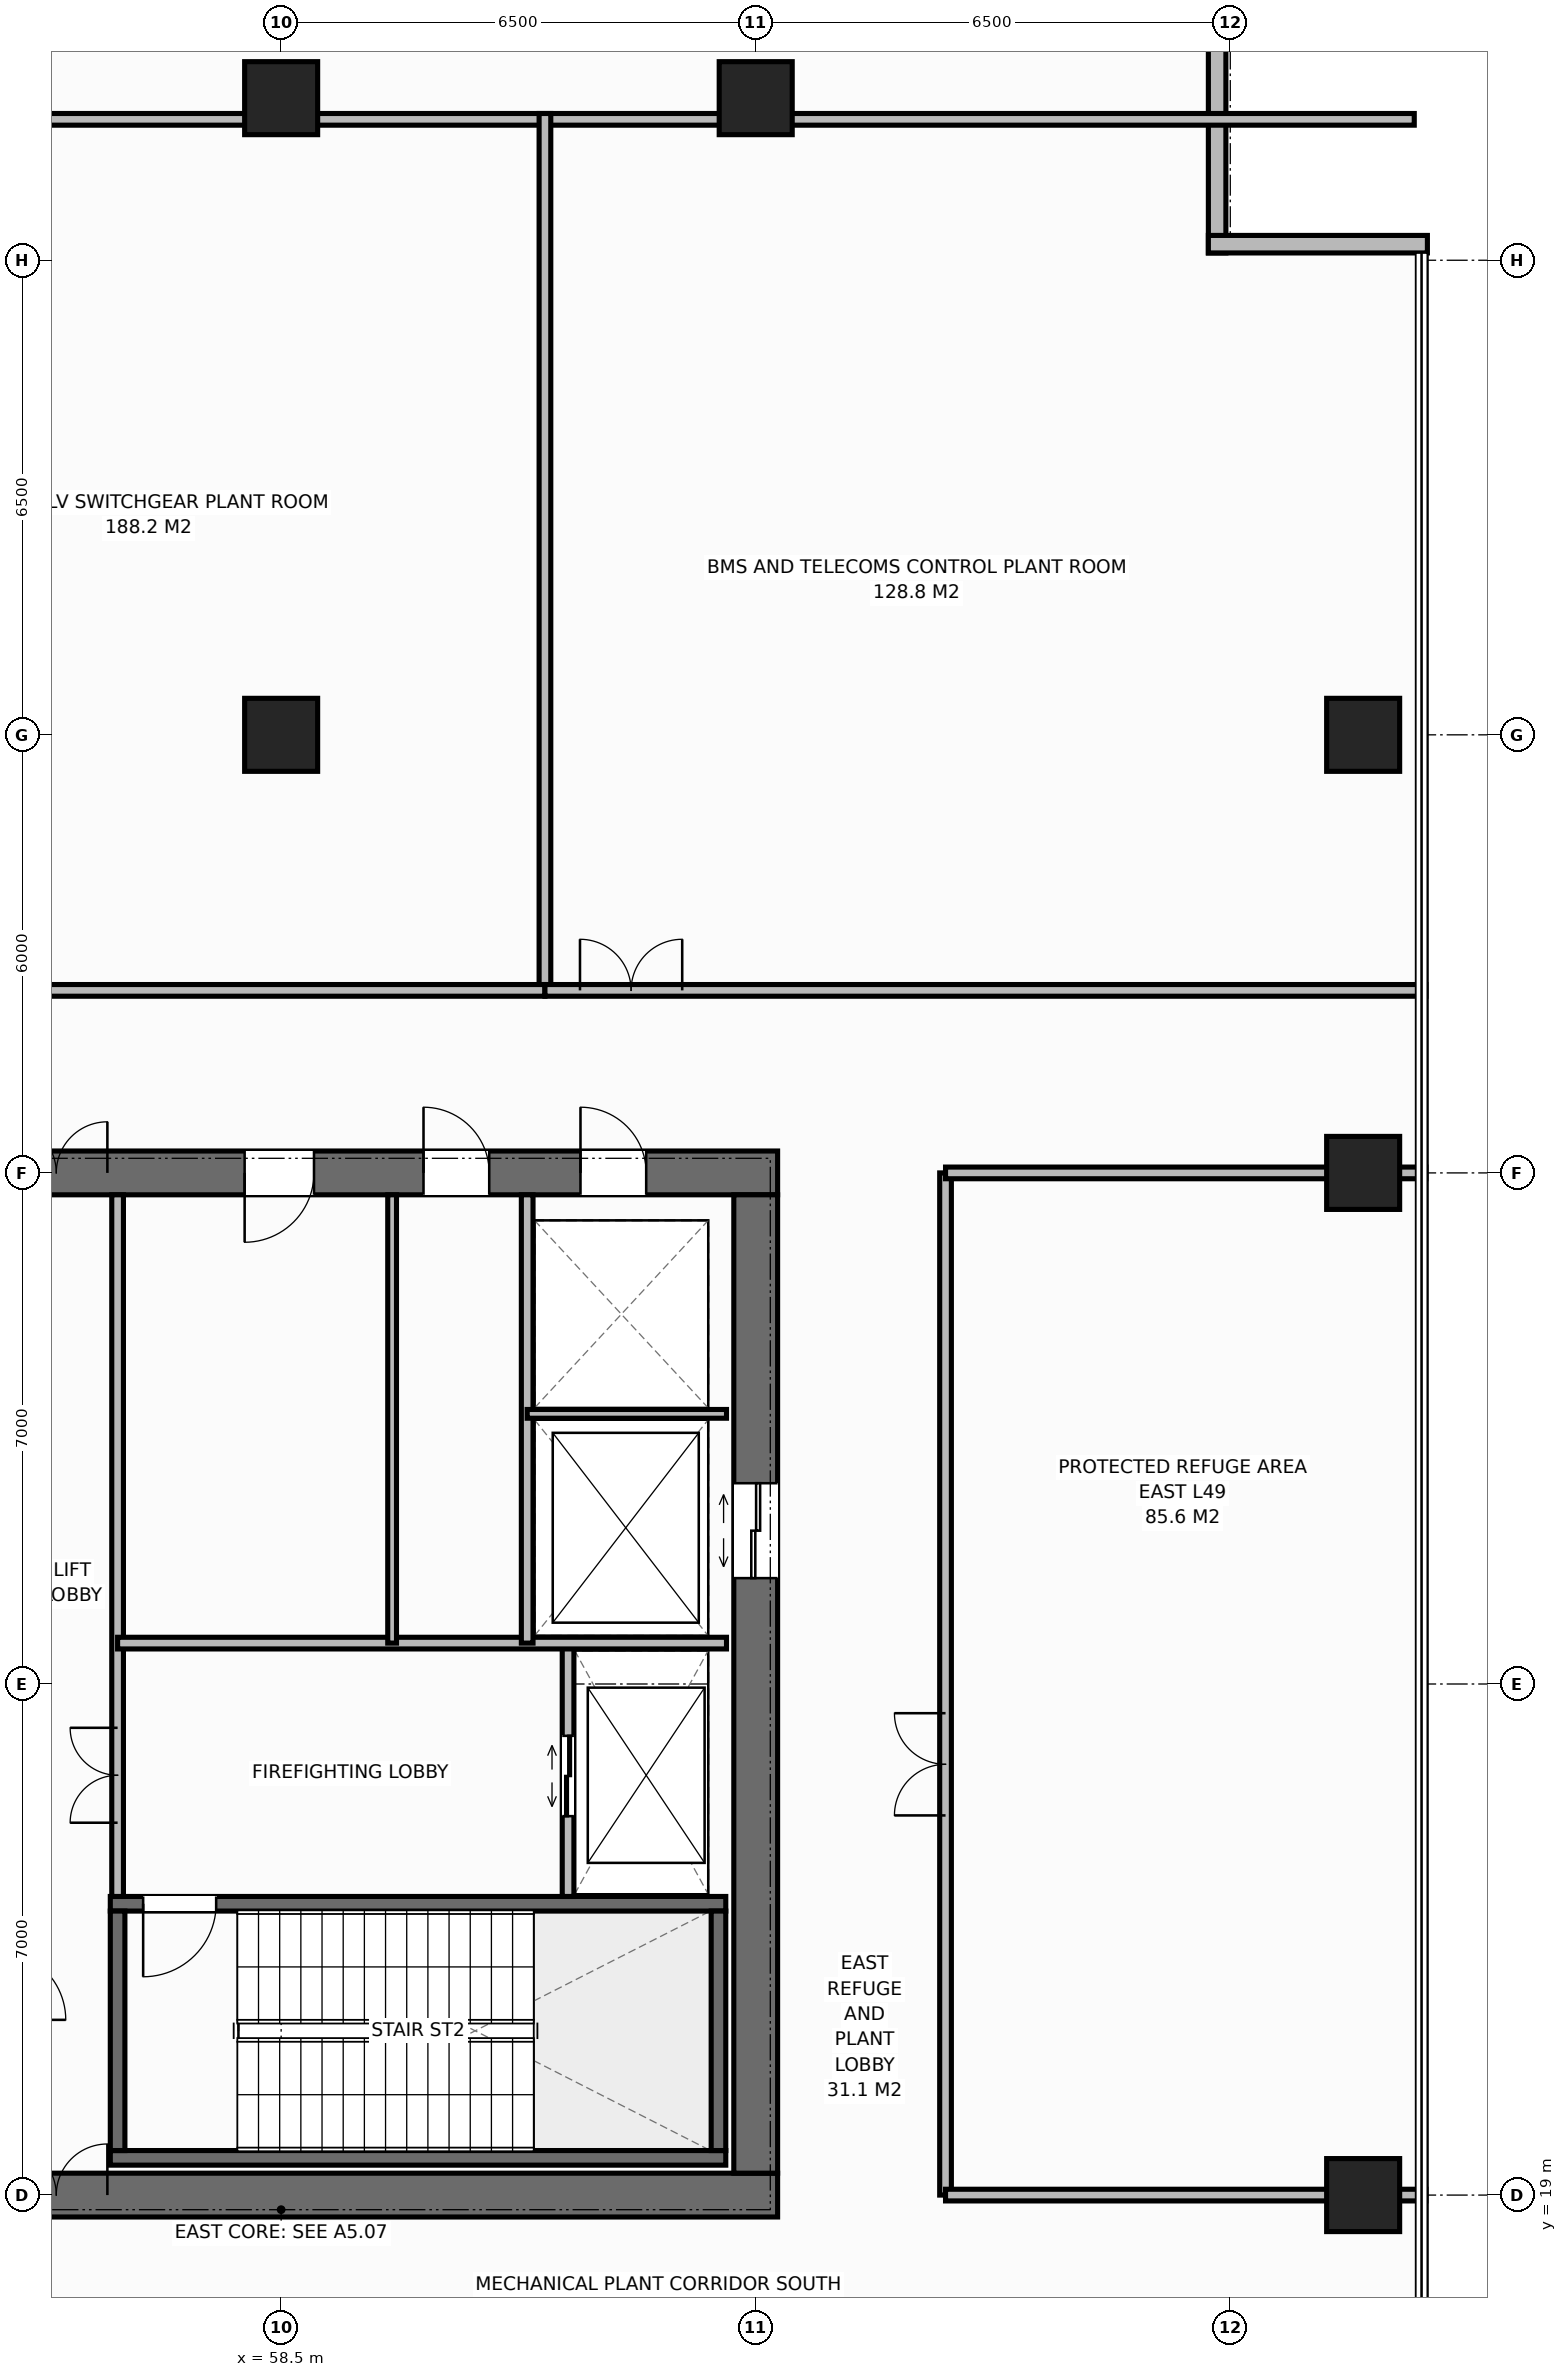
"""IFC4 building model, lengths in metres.
Left out: names, types, materials, properties, quantities, classifications, styles, units other than length and angle.
Written with IfcOpenShell. Run it as: python <this file> out.ifc"""

import sys

from ifc_helpers import new_model, si_unit, direction, frame, frame_2d, origin, origin_2d, place, context, subcontext, project, spatial, rectangle, extrude, element, fill, save


model = new_model("IFC4")
c1 = context("Model", 3, precision=1e-05, world=origin(), true_north=direction((0.0, 1.0)))
c2 = subcontext(c1, "Body", "Model", "MODEL_VIEW")
j1 = project(units=[si_unit("LENGTHUNIT", "METRE"), si_unit("PLANEANGLEUNIT", "RADIAN")], contexts=[c1])
p1 = place(None, origin())
s1 = spatial("IfcSite", under=j1, at=p1, CompositionType="ELEMENT")
p2 = place(p1, origin())
s2 = spatial("IfcBuilding", under=s1, at=p2, CompositionType="ELEMENT")
p3 = place(p2, frame((0.0, 0.0, 197.4)))
s3 = spatial("IfcBuildingStorey", under=s2, at=p3, CompositionType="ELEMENT", Elevation=197.4)
p4 = place(p3, frame((51.7, 19.0, 0.0), z_axis=(0.0, 0.0, 1.0), x_axis=(1.0, 0.0, 0.0)))
e1 = element("IfcWall", 1, at=p4, inside=s3, PredefinedType="SHEAR", context=c2, shape_type="SweptSolid", body=[
    extrude(rectangle(XDim=13.6, YDim=0.6, at=frame_2d((6.8, 0.0))), origin(), (0.0, 0.0, 1.0), 5.0),
])
p5 = place(p4, frame((3.02, 0.0, 0.0)))
e2 = element("IfcOpeningElement", 2, at=p5, cuts=e1, PredefinedType="OPENING", context=c2, shape_type="SweptSolid", body=[
    extrude(rectangle(XDim=1.4, YDim=2.2, at=frame_2d((0.7, 1.1))), frame((0.0, 0.31, 0.0), z_axis=(0.0, -1.0, 0.0), x_axis=(1.0, 0.0, 0.0)), (0.0, 0.0, 1.0), 0.62),
])
p6 = place(p3, frame((51.7, 33.0, 0.0), z_axis=(0.0, 0.0, 1.0), x_axis=(1.0, 0.0, 0.0)))
e3 = element("IfcWall", 3, at=p6, inside=s3, PredefinedType="SHEAR", context=c2, shape_type="SweptSolid", body=[
    extrude(rectangle(XDim=13.6, YDim=0.6, at=frame_2d((6.8, 0.0))), origin(), (0.0, 0.0, 1.0), 5.0),
])
p7 = place(p6, frame((3.02, 0.0, 0.0)))
e4 = element("IfcOpeningElement", 4, at=p7, cuts=e3, PredefinedType="OPENING", context=c2, shape_type="SweptSolid", body=[
    extrude(rectangle(XDim=1.4, YDim=2.2, at=frame_2d((0.7, 1.1))), frame((0.0, 0.31, 0.0), z_axis=(0.0, -1.0, 0.0), x_axis=(1.0, 0.0, 0.0)), (0.0, 0.0, 1.0), 0.62),
])
p8 = place(p6, frame((10.9, 0.0, 0.0)))
e5 = element("IfcOpeningElement", 5, at=p8, cuts=e3, PredefinedType="OPENING", context=c2, shape_type="SweptSolid", body=[
    extrude(rectangle(XDim=0.9, YDim=2.15, at=frame_2d((0.45, 1.075))), frame((0.0, 0.31, 0.0), z_axis=(0.0, -1.0, 0.0), x_axis=(1.0, 0.0, 0.0)), (0.0, 0.0, 1.0), 0.62),
])
p9 = place(p6, frame((6.3, 0.0, 0.0)))
e6 = element("IfcOpeningElement", 6, at=p9, cuts=e3, PredefinedType="OPENING", context=c2, shape_type="SweptSolid", body=[
    extrude(rectangle(XDim=0.95, YDim=2.15, at=frame_2d((0.475, 1.075))), frame((0.0, 0.31, 0.0), z_axis=(0.0, -1.0, 0.0), x_axis=(1.0, 0.0, 0.0)), (0.0, 0.0, 1.0), 0.62),
])
p10 = place(p6, frame((8.75, 0.0, 0.0)))
e7 = element("IfcOpeningElement", 7, at=p10, cuts=e3, PredefinedType="OPENING", context=c2, shape_type="SweptSolid", body=[
    extrude(rectangle(XDim=0.9, YDim=2.15, at=frame_2d((0.45, 1.075))), frame((0.0, 0.31, 0.0), z_axis=(0.0, -1.0, 0.0), x_axis=(1.0, 0.0, 0.0)), (0.0, 0.0, 1.0), 0.62),
])
p11 = place(p3, frame((65.0, 19.3, 0.0), z_axis=(0.0, 0.0, 1.0), x_axis=(0.0, 1.0, 0.0)))
e8 = element("IfcWall", 8, at=p11, inside=s3, PredefinedType="SHEAR", context=c2, shape_type="SweptSolid", body=[
    extrude(rectangle(XDim=13.4, YDim=0.6, at=frame_2d((6.7, 0.0))), origin(), (0.0, 0.0, 1.0), 5.0),
])
p12 = place(p11, frame((8.15, 0.0, 0.0)))
e9 = element("IfcOpeningElement", 9, at=p12, cuts=e8, PredefinedType="OPENING", context=c2, shape_type="SweptSolid", body=[
    extrude(rectangle(XDim=1.3, YDim=2.2, at=frame_2d((0.65, 1.1))), frame((0.0, 0.31, 0.0), z_axis=(0.0, -1.0, 0.0), x_axis=(1.0, 0.0, 0.0)), (0.0, 0.0, 1.0), 0.62),
])
p13 = place(p3, frame((56.16, 19.51, 0.0), z_axis=(0.0, 0.0, 1.0), x_axis=(1.0, 0.0, 0.0)))
e10 = element("IfcWall", 10, at=p13, inside=s3, PredefinedType="SHEAR", context=c2, shape_type="SweptSolid", body=[
    extrude(rectangle(XDim=8.43, YDim=0.2, at=frame_2d((4.215, 0.0))), origin(), (0.0, 0.0, 1.0), 5.0),
])
p14 = place(p3, frame((56.16, 22.99, 0.0), z_axis=(0.0, 0.0, 1.0), x_axis=(1.0, 0.0, 0.0)))
e11 = element("IfcWall", 11, at=p14, inside=s3, PredefinedType="SHEAR", context=c2, shape_type="SweptSolid", body=[
    extrude(rectangle(XDim=8.43, YDim=0.2, at=frame_2d((4.215, 0.0))), origin(), (0.0, 0.0, 1.0), 5.0),
])
p15 = place(p14, frame((0.45, 0.0, 0.0)))
e12 = element("IfcOpeningElement", 12, at=p15, cuts=e11, PredefinedType="OPENING", context=c2, shape_type="SweptSolid", body=[
    extrude(rectangle(XDim=1.0, YDim=2.15, at=frame_2d((0.5, 1.075))), frame((0.0, 0.11, 0.0), z_axis=(0.0, -1.0, 0.0), x_axis=(1.0, 0.0, 0.0)), (0.0, 0.0, 1.0), 0.22),
])
for number, where, z_axis, x_axis in (
    (13, (56.26, 19.61, 0.0), (0.0, 0.0, 1.0), (0.0, 1.0, 0.0)),
    (14, (64.49, 19.61, 0.0), (0.0, 0.0, 1.0), (0.0, 1.0, 0.0)),
):
    element("IfcWall", number, at=place(p3, frame(where, z_axis=z_axis, x_axis=x_axis)), inside=s3, PredefinedType="SHEAR", context=c2, shape_type="SweptSolid", body=[
        extrude(rectangle(XDim=3.28, YDim=0.2, at=frame_2d((1.64, 0.0))), origin(), (0.0, 0.0, 1.0), 5.0),
    ])
for number, where, z_axis, x_axis in (
    (15, (58.5, 39.0, 0.0), (0.0, 0.0, 1.0), (1.0, 0.0, 0.0)),
    (16, (58.5, 47.72, 0.0), (0.0, 0.0, 1.0), (1.0, 0.0, 0.0)),
    (17, (65.0, 47.72, 0.0), (0.0, 0.0, 1.0), (1.0, 0.0, 0.0)),
    (18, (73.32, 19.0, 0.0), (0.0, 0.0, 1.0), (1.0, 0.0, 0.0)),
    (19, (73.32, 33.0, 0.0), (0.0, 0.0, 1.0), (1.0, 0.0, 0.0)),
    (20, (73.32, 39.0, 0.0), (0.0, 0.0, 1.0), (1.0, 0.0, 0.0)),
):
    element("IfcColumn", number, at=place(p3, frame(where, z_axis=z_axis, x_axis=x_axis)), inside=s3, PredefinedType="COLUMN", context=c2, shape_type="SweptSolid", body=[
        extrude(rectangle(XDim=1.0, YDim=1.0, at=origin_2d()), origin(), (0.0, 0.0, 1.0), 5.0),
    ])
for number, where, z_axis, x_axis in (
    (21, (71.32, 48.6, 0.0), (0.0, 0.0, 1.0), (0.0, -1.0, 0.0)),
    (22, (71.2, 45.72, 0.0), (0.0, 0.0, 1.0), (1.0, 0.0, 0.0)),
):
    element("IfcWall", number, at=place(p3, frame(where, z_axis=z_axis, x_axis=x_axis)), inside=s3, PredefinedType="STANDARD", context=c2, shape_type="SweptSolid", body=[
        extrude(rectangle(XDim=3.0, YDim=0.24, at=frame_2d((1.5, 0.0))), origin(), (0.0, 0.0, 1.0), 4.78),
    ])
p16 = place(p3, frame((56.26, 23.09, 0.0), z_axis=(0.0, 0.0, 1.0), x_axis=(0.0, 1.0, 0.0)))
e23 = element("IfcWall", 23, at=p16, inside=s3, PredefinedType="STANDARD", context=c2, shape_type="SweptSolid", body=[
    extrude(rectangle(XDim=9.61, YDim=0.16, at=frame_2d((4.805, 0.0))), origin(), (0.0, 0.0, 1.0), 4.78),
])
p17 = place(p16, frame((1.01, 0.0, 0.0)))
e24 = element("IfcOpeningElement", 24, at=p17, cuts=e23, PredefinedType="OPENING", context=c2, shape_type="SweptSolid", body=[
    extrude(rectangle(XDim=1.3, YDim=2.2, at=frame_2d((0.65, 1.1))), frame((0.0, 0.09, 0.0), z_axis=(0.0, -1.0, 0.0), x_axis=(1.0, 0.0, 0.0)), (0.0, 0.0, 1.0), 0.18),
])
p18 = place(p3, frame((62.43, 23.09, 0.0), z_axis=(0.0, 0.0, 1.0), x_axis=(0.0, 1.0, 0.0)))
e25 = element("IfcWall", 25, at=p18, inside=s3, PredefinedType="STANDARD", context=c2, shape_type="SweptSolid", body=[
    extrude(rectangle(XDim=3.47, YDim=0.16, at=frame_2d((1.735, 0.0))), origin(), (0.0, 0.0, 1.0), 4.78),
])
p19 = place(p18, frame((1.1, 0.0, 0.0)))
e26 = element("IfcOpeningElement", 26, at=p19, cuts=e25, PredefinedType="OPENING", context=c2, shape_type="SweptSolid", body=[
    extrude(rectangle(XDim=1.1, YDim=2.2, at=frame_2d((0.55, 1.1))), frame((0.0, 0.09, 0.0), z_axis=(0.0, -1.0, 0.0), x_axis=(1.0, 0.0, 0.0)), (0.0, 0.0, 1.0), 0.18),
])
p20 = place(p3, frame((56.26, 26.56, 0.0), z_axis=(0.0, 0.0, 1.0), x_axis=(1.0, 0.0, 0.0)))
e27 = element("IfcWall", 27, at=p20, inside=s3, PredefinedType="STANDARD", context=c2, shape_type="SweptSolid", body=[
    extrude(rectangle(XDim=8.34, YDim=0.16, at=frame_2d((4.17, 0.0))), origin(), (0.0, 0.0, 1.0), 4.78),
])
p21 = place(p3, frame((61.87, 26.56, 0.0), z_axis=(0.0, 0.0, 1.0), x_axis=(0.0, 1.0, 0.0)))
e28 = element("IfcWall", 28, at=p21, inside=s3, PredefinedType="STANDARD", context=c2, shape_type="SweptSolid", body=[
    extrude(rectangle(XDim=6.14, YDim=0.16, at=frame_2d((3.07, 0.0))), origin(), (0.0, 0.0, 1.0), 4.78),
])
p22 = place(p3, frame((61.87, 29.7, 0.0), z_axis=(0.0, 0.0, 1.0), x_axis=(1.0, 0.0, 0.0)))
e29 = element("IfcWall", 29, at=p22, inside=s3, PredefinedType="PARTITIONING", context=c2, shape_type="SweptSolid", body=[
    extrude(rectangle(XDim=2.73, YDim=0.12, at=frame_2d((1.365, 0.0))), origin(), (0.0, 0.0, 1.0), 4.78),
])
p23 = place(p3, frame((60.02, 26.56, 0.0), z_axis=(0.0, 0.0, 1.0), x_axis=(0.0, 1.0, 0.0)))
e30 = element("IfcWall", 30, at=p23, inside=s3, PredefinedType="PARTITIONING", context=c2, shape_type="SweptSolid", body=[
    extrude(rectangle(XDim=6.14, YDim=0.12, at=frame_2d((3.07, 0.0))), origin(), (0.0, 0.0, 1.0), 4.78),
])
p24 = place(p3, frame((3.98, 47.43, 0.0), z_axis=(0.0, 0.0, 1.0), x_axis=(1.0, 0.0, 0.0)))
e31 = element("IfcWall", 31, at=p24, inside=s3, PredefinedType="STANDARD", context=c2, shape_type="SweptSolid", body=[
    extrude(rectangle(XDim=70.04, YDim=0.16, at=frame_2d((35.02, 0.0))), origin(), (0.0, 0.0, 1.0), 4.78),
])
p25 = place(p3, frame((67.6, 19.0, 0.0), z_axis=(0.0, 0.0, 1.0), x_axis=(0.0, 1.0, 0.0)))
e32 = element("IfcWall", 32, at=p25, inside=s3, PredefinedType="STANDARD", context=c2, shape_type="SweptSolid", body=[
    extrude(rectangle(XDim=14.0, YDim=0.16, at=frame_2d((7.0, 0.0))), origin(), (0.0, 0.0, 1.0), 4.78),
])
p26 = place(p25, frame((5.2, 0.0, 0.0)))
e33 = element("IfcOpeningElement", 33, at=p26, cuts=e32, PredefinedType="OPENING", context=c2, shape_type="SweptSolid", body=[
    extrude(rectangle(XDim=1.4, YDim=2.2, at=frame_2d((0.7, 1.1))), frame((0.0, 0.09, 0.0), z_axis=(0.0, -1.0, 0.0), x_axis=(1.0, 0.0, 0.0)), (0.0, 0.0, 1.0), 0.18),
])
for number, where, z_axis, x_axis in (
    (34, (67.6, 19.0, 0.0), (0.0, 0.0, 1.0), (1.0, 0.0, 0.0)),
    (35, (67.6, 33.0, 0.0), (0.0, 0.0, 1.0), (1.0, 0.0, 0.0)),
):
    element("IfcWall", number, at=place(p3, frame(where, z_axis=z_axis, x_axis=x_axis)), inside=s3, PredefinedType="STANDARD", context=c2, shape_type="SweptSolid", body=[
        extrude(rectangle(XDim=6.58, YDim=0.16, at=frame_2d((3.29, 0.0))), origin(), (0.0, 0.0, 1.0), 3.26),
    ])
p27 = place(p3, frame((62.113, 35.5, 0.0), z_axis=(0.0, 0.0, 1.0), x_axis=(0.0, 1.0, 0.0)))
e36 = element("IfcWall", 36, at=p27, inside=s3, PredefinedType="STANDARD", context=c2, shape_type="SweptSolid", body=[
    extrude(rectangle(XDim=12.01, YDim=0.16, at=frame_2d((6.005, 0.0))), origin(), (0.0, 0.0, 1.0), 4.78),
])
p28 = place(p3, frame((46.004, 35.5, 0.0), z_axis=(0.0, 0.0, 1.0), x_axis=(1.0, 0.0, 0.0)))
e37 = element("IfcWall", 37, at=p28, inside=s3, PredefinedType="STANDARD", context=c2, shape_type="SweptSolid", body=[
    extrude(rectangle(XDim=16.109, YDim=0.16, at=frame_2d((8.055, 0.0))), origin(), (0.0, 0.0, 1.0), 4.78),
])
p29 = place(p28, frame((7.354, 0.0, 0.0)))
e38 = element("IfcOpeningElement", 38, at=p29, cuts=e37, PredefinedType="OPENING", context=c2, shape_type="SweptSolid", body=[
    extrude(rectangle(XDim=1.4, YDim=2.2, at=frame_2d((0.7, 1.1))), frame((0.0, 0.09, 0.0), z_axis=(0.0, -1.0, 0.0), x_axis=(1.0, 0.0, 0.0)), (0.0, 0.0, 1.0), 0.18),
])
p30 = place(p3, frame((62.113, 35.5, 0.0), z_axis=(0.0, 0.0, 1.0), x_axis=(1.0, 0.0, 0.0)))
e39 = element("IfcWall", 39, at=p30, inside=s3, PredefinedType="STANDARD", context=c2, shape_type="SweptSolid", body=[
    extrude(rectangle(XDim=12.067, YDim=0.16, at=frame_2d((6.033, 0.0))), origin(), (0.0, 0.0, 1.0), 4.78),
])
p31 = place(p30, frame((0.48, 0.0, 0.0)))
e40 = element("IfcOpeningElement", 40, at=p31, cuts=e39, PredefinedType="OPENING", context=c2, shape_type="SweptSolid", body=[
    extrude(rectangle(XDim=1.4, YDim=2.2, at=frame_2d((0.7, 1.1))), frame((0.0, 0.09, 0.0), z_axis=(0.0, -1.0, 0.0), x_axis=(1.0, 0.0, 0.0)), (0.0, 0.0, 1.0), 0.18),
])
p32 = place(p5, origin())
e41 = element("IfcDoor", 41, at=p32, inside=s3, OperationType="DOUBLE_DOOR_SINGLE_SWING", PredefinedType="DOOR", context=c2, shape_type="SweptSolid", body=[
    extrude(rectangle(XDim=1.4, YDim=2.2, at=frame_2d((0.7, 1.1))), frame((0.0, 0.075, 0.0), z_axis=(0.0, -1.0, 0.0), x_axis=(1.0, 0.0, 0.0)), (0.0, 0.0, 1.0), 0.05),
])
fill(e2, e41)
p33 = place(p7, origin())
e42 = element("IfcDoor", 42, at=p33, inside=s3, OperationType="DOUBLE_DOOR_SINGLE_SWING", PredefinedType="DOOR", context=c2, shape_type="SweptSolid", body=[
    extrude(rectangle(XDim=1.4, YDim=2.2, at=frame_2d((0.7, 1.1))), frame((0.0, -0.025, 0.0), z_axis=(0.0, -1.0, 0.0), x_axis=(1.0, 0.0, 0.0)), (0.0, 0.0, 1.0), 0.05),
])
fill(e4, e42)
p34 = place(p15, origin())
e43 = element("IfcDoor", 43, at=p34, inside=s3, OperationType="SINGLE_SWING_RIGHT", PredefinedType="DOOR", context=c2, shape_type="SweptSolid", body=[
    extrude(rectangle(XDim=1.0, YDim=2.15, at=frame_2d((0.5, 1.075))), frame((0.0, 0.025, 0.0), z_axis=(0.0, -1.0, 0.0), x_axis=(1.0, 0.0, 0.0)), (0.0, 0.0, 1.0), 0.05),
])
fill(e12, e43)
p35 = place(p19, origin())
e44 = element("IfcDoor", 44, at=p35, inside=s3, OperationType="DOUBLE_DOOR_SLIDING", PredefinedType="DOOR", context=c2, shape_type="SweptSolid", body=[
    extrude(rectangle(XDim=1.1, YDim=2.2, at=frame_2d((0.55, 1.1))), frame((0.0, 0.025, 0.0), z_axis=(0.0, -1.0, 0.0), x_axis=(1.0, 0.0, 0.0)), (0.0, 0.0, 1.0), 0.05),
])
fill(e26, e44)
p36 = place(p17, origin())
e45 = element("IfcDoor", 45, at=p36, inside=s3, OperationType="DOUBLE_DOOR_SINGLE_SWING", PredefinedType="DOOR", context=c2, shape_type="SweptSolid", body=[
    extrude(rectangle(XDim=1.3, YDim=2.2, at=frame_2d((0.65, 1.1))), frame((0.0, 0.025, 0.0), z_axis=(0.0, -1.0, 0.0), x_axis=(1.0, 0.0, 0.0)), (0.0, 0.0, 1.0), 0.05),
])
fill(e24, e45)
p37 = place(p12, origin())
e46 = element("IfcDoor", 46, at=p37, inside=s3, OperationType="DOUBLE_DOOR_SLIDING", PredefinedType="DOOR", context=c2, shape_type="SweptSolid", body=[
    extrude(rectangle(XDim=1.3, YDim=2.2, at=frame_2d((0.65, 1.1))), frame((0.0, 0.025, 0.0), z_axis=(0.0, -1.0, 0.0), x_axis=(1.0, 0.0, 0.0)), (0.0, 0.0, 1.0), 0.05),
])
fill(e9, e46)
p38 = place(p8, origin())
e47 = element("IfcDoor", 47, at=p38, inside=s3, OperationType="SINGLE_SWING_LEFT", PredefinedType="DOOR", context=c2, shape_type="SweptSolid", body=[
    extrude(rectangle(XDim=0.9, YDim=2.15, at=frame_2d((0.45, 1.075))), frame((0.0, -0.025, 0.0), z_axis=(0.0, -1.0, 0.0), x_axis=(1.0, 0.0, 0.0)), (0.0, 0.0, 1.0), 0.05),
])
fill(e5, e47)
p39 = place(p9, origin())
e48 = element("IfcDoor", 48, at=p39, inside=s3, OperationType="SINGLE_SWING_RIGHT", PredefinedType="DOOR", context=c2, shape_type="SweptSolid", body=[
    extrude(rectangle(XDim=0.95, YDim=2.15, at=frame_2d((0.475, 1.075))), frame((0.0, -0.025, 0.0), z_axis=(0.0, -1.0, 0.0), x_axis=(1.0, 0.0, 0.0)), (0.0, 0.0, 1.0), 0.05),
])
fill(e6, e48)
p40 = place(p10, origin())
e49 = element("IfcDoor", 49, at=p40, inside=s3, OperationType="SINGLE_SWING_LEFT", PredefinedType="DOOR", context=c2, shape_type="SweptSolid", body=[
    extrude(rectangle(XDim=0.9, YDim=2.15, at=frame_2d((0.45, 1.075))), frame((0.0, -0.025, 0.0), z_axis=(0.0, -1.0, 0.0), x_axis=(1.0, 0.0, 0.0)), (0.0, 0.0, 1.0), 0.05),
])
fill(e7, e49)
p41 = place(p26, origin())
e50 = element("IfcDoor", 50, at=p41, inside=s3, OperationType="DOUBLE_DOOR_SINGLE_SWING", PredefinedType="DOOR", context=c2, shape_type="SweptSolid", body=[
    extrude(rectangle(XDim=1.4, YDim=2.2, at=frame_2d((0.7, 1.1))), frame((0.0, 0.025, 0.0), z_axis=(0.0, -1.0, 0.0), x_axis=(1.0, 0.0, 0.0)), (0.0, 0.0, 1.0), 0.05),
])
fill(e33, e50)
p42 = place(p31, origin())
e51 = element("IfcDoor", 51, at=p42, inside=s3, OperationType="DOUBLE_DOOR_SINGLE_SWING", PredefinedType="DOOR", context=c2, shape_type="SweptSolid", body=[
    extrude(rectangle(XDim=1.4, YDim=2.2, at=frame_2d((0.7, 1.1))), frame((0.0, 0.025, 0.0), z_axis=(0.0, -1.0, 0.0), x_axis=(1.0, 0.0, 0.0)), (0.0, 0.0, 1.0), 0.05),
])
fill(e40, e51)
save(model, sys.argv[1])
